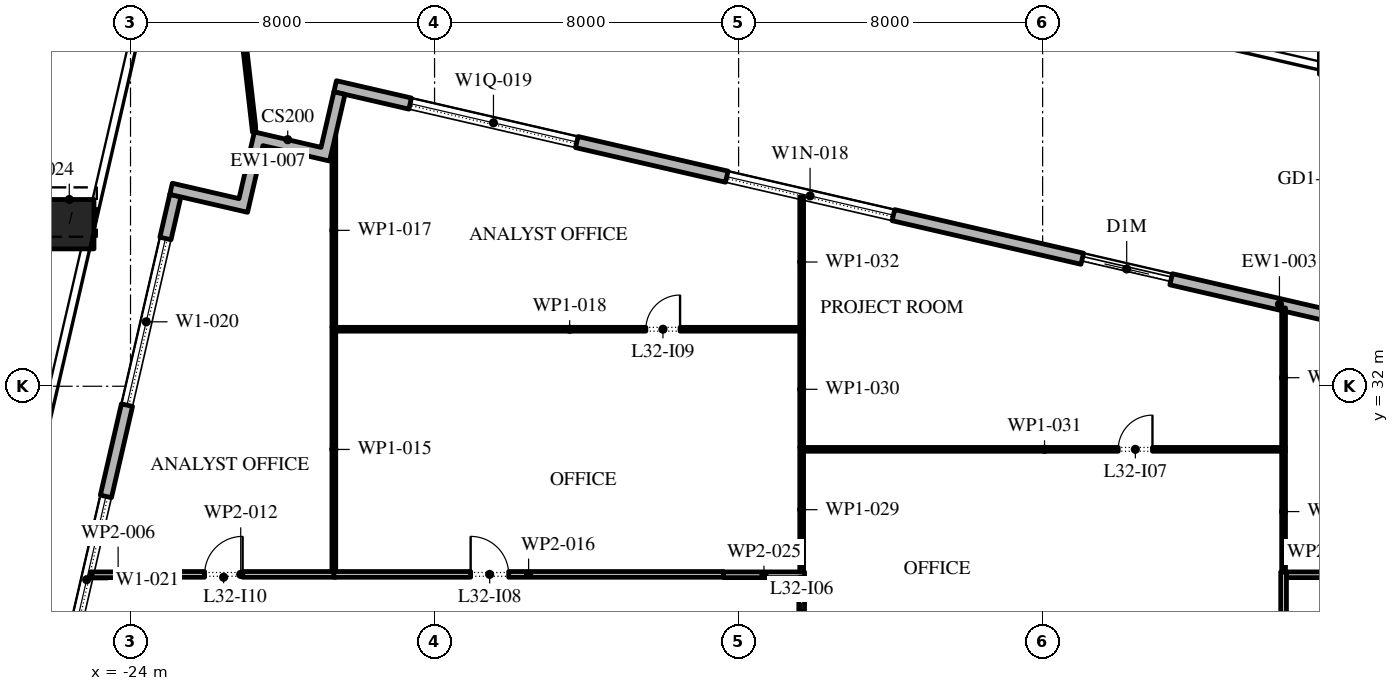
"""IFC4 building model, lengths in metres.
Left out: names, types, materials, properties, quantities, classifications, styles, units other than length and angle.
Written with IfcOpenShell. Run it as: python <this file> out.ifc"""

import sys

from ifc_helpers import new_model, si_unit, direction, frame, frame_2d, origin, origin_2d, place, context, subcontext, project, spatial, polyline, rectangle, outline, extrude, element, fill, save


model = new_model("IFC4")
c1 = context("Model", 3, precision=1e-05, world=origin(), true_north=direction((0.0, 1.0)))
c2 = subcontext(c1, "Body", "Model", "MODEL_VIEW")
j1 = project(units=[si_unit("LENGTHUNIT", "METRE"), si_unit("PLANEANGLEUNIT", "RADIAN")], contexts=[c1])
p1 = place(None, origin())
s1 = spatial("IfcSite", under=j1, at=p1, CompositionType="ELEMENT")
p2 = place(p1, origin())
s2 = spatial("IfcBuilding", under=s1, at=p2, CompositionType="ELEMENT")
p3 = place(p2, frame((0.0, 0.0, 147.6)))
s3 = spatial("IfcBuildingStorey", under=s2, at=p3, CompositionType="ELEMENT", Elevation=147.6)
p4 = place(p3, frame((7.933, 40.86, 0.0), z_axis=(0.020377493232, 0.0882252832, 0.995892091129), x_axis=(-0.97434807649, 0.225046274885, 0.0)))
e1 = element("IfcColumn", 1, at=p4, inside=s3, PredefinedType="COLUMN", context=c2, shape_type="SweptSolid", body=[
    extrude(rectangle(XDim=1.3, YDim=1.3, at=origin_2d()), origin(), (0.0, 0.0, 1.0), 4.217),
])
p5 = place(p3, frame((-25.611, 36.264, 0.0), z_axis=(0.017444089556, 0.075687644385, 0.996978978829), x_axis=(-0.974454034257, 0.224587032398, 0.0)))
e2 = element("IfcColumn", 2, at=p5, inside=s3, PredefinedType="COLUMN", context=c2, shape_type="SweptSolid", body=[
    extrude(rectangle(XDim=1.3, YDim=1.3, at=origin_2d()), origin(), (0.0, 0.0, 1.0), 4.213),
])
p6 = place(p3, frame((31.078, 28.421, 0.0), z_axis=(0.0, 0.0, 1.0), x_axis=(-0.974370456532, 0.224949357493, 0.0)))
e3 = element("IfcWall", 3, at=p6, inside=s3, PredefinedType="STANDARD", context=c2, shape_type="SweptSolid", body=[
    extrude(rectangle(XDim=51.0, YDim=0.3, at=frame_2d((25.5, 0.0))), origin(), (0.0, 0.0, 1.0), 4.0),
])
p7 = place(p6, frame((1.875, 0.0, 0.45)))
e4 = element("IfcOpeningElement", 4, at=p7, cuts=e3, PredefinedType="OPENING", context=c2, shape_type="SweptSolid", body=[
    extrude(rectangle(XDim=4.5, YDim=2.875, at=frame_2d((2.25, 1.438))), frame((0.0, 0.16, 0.0), z_axis=(0.0, -1.0, 0.0), x_axis=(1.0, 0.0, 0.0)), (0.0, 0.0, 1.0), 0.32),
])
p8 = place(p6, frame((10.275, 0.0, 0.45)))
e5 = element("IfcOpeningElement", 5, at=p8, cuts=e3, PredefinedType="OPENING", context=c2, shape_type="SweptSolid", body=[
    extrude(rectangle(XDim=4.5, YDim=2.75, at=frame_2d((2.25, 1.375))), frame((0.0, 0.16, 0.0), z_axis=(0.0, -1.0, 0.0), x_axis=(1.0, 0.0, 0.0)), (0.0, 0.0, 1.0), 0.32),
])
p9 = place(p6, frame((18.825, 0.0, 0.45)))
e6 = element("IfcOpeningElement", 6, at=p9, cuts=e3, PredefinedType="OPENING", context=c2, shape_type="SweptSolid", body=[
    extrude(rectangle(XDim=4.5, YDim=2.675, at=frame_2d((2.25, 1.337))), frame((0.0, 0.16, 0.0), z_axis=(0.0, -1.0, 0.0), x_axis=(1.0, 0.0, 0.0)), (0.0, 0.0, 1.0), 0.32),
])
p10 = place(p6, frame((28.425, 0.0, 0.0)))
e7 = element("IfcOpeningElement", 7, at=p10, cuts=e3, PredefinedType="OPENING", context=c2, shape_type="SweptSolid", body=[
    extrude(rectangle(XDim=2.4, YDim=3.025, at=frame_2d((1.2, 1.512))), frame((0.0, 0.16, 0.0), z_axis=(0.0, -1.0, 0.0), x_axis=(1.0, 0.0, 0.0)), (0.0, 0.0, 1.0), 0.32),
])
p11 = place(p6, frame((35.925, 0.0, 0.45)))
e8 = element("IfcOpeningElement", 8, at=p11, cuts=e3, PredefinedType="OPENING", context=c2, shape_type="SweptSolid", body=[
    extrude(rectangle(XDim=4.5, YDim=2.525, at=frame_2d((2.25, 1.262))), frame((0.0, 0.16, 0.0), z_axis=(0.0, -1.0, 0.0), x_axis=(1.0, 0.0, 0.0)), (0.0, 0.0, 1.0), 0.32),
])
p12 = place(p6, frame((44.475, 0.0, 0.45)))
e9 = element("IfcOpeningElement", 9, at=p12, cuts=e3, PredefinedType="OPENING", context=c2, shape_type="SweptSolid", body=[
    extrude(rectangle(XDim=4.5, YDim=2.45, at=frame_2d((2.25, 1.225))), frame((0.0, 0.16, 0.0), z_axis=(0.0, -1.0, 0.0), x_axis=(1.0, 0.0, 0.0)), (0.0, 0.0, 1.0), 0.32),
])
p13 = place(p3, frame((-22.82, 37.016, 0.0), z_axis=(0.0, 0.0, 1.0), x_axis=(-0.224953880882, -0.974369412223, 0.0)))
e10 = element("IfcWall", 10, at=p13, inside=s3, PredefinedType="STANDARD", context=c2, shape_type="SweptSolid", body=[
    extrude(rectangle(XDim=49.5, YDim=0.3, at=frame_2d((24.75, 0.0))), origin(), (0.0, 0.0, 1.0), 4.0),
])
p14 = place(p13, frame((1.157, 0.0, 0.45)))
e11 = element("IfcOpeningElement", 11, at=p14, cuts=e10, PredefinedType="OPENING", context=c2, shape_type="SweptSolid", body=[
    extrude(rectangle(XDim=4.5, YDim=3.05, at=frame_2d((2.25, 1.525))), frame((0.0, 0.16, 0.0), z_axis=(0.0, -1.0, 0.0), x_axis=(1.0, 0.0, 0.0)), (0.0, 0.0, 1.0), 0.32),
])
p15 = place(p13, frame((8.121, 0.0, 0.45)))
e12 = element("IfcOpeningElement", 12, at=p15, cuts=e10, PredefinedType="OPENING", context=c2, shape_type="SweptSolid", body=[
    extrude(rectangle(XDim=4.5, YDim=3.05, at=frame_2d((2.25, 1.525))), frame((0.0, 0.16, 0.0), z_axis=(0.0, -1.0, 0.0), x_axis=(1.0, 0.0, 0.0)), (0.0, 0.0, 1.0), 0.32),
])
p16 = place(p13, frame((15.236, 0.0, 0.45)))
e13 = element("IfcOpeningElement", 13, at=p16, cuts=e10, PredefinedType="OPENING", context=c2, shape_type="SweptSolid", body=[
    extrude(rectangle(XDim=4.5, YDim=3.05, at=frame_2d((2.25, 1.525))), frame((0.0, 0.16, 0.0), z_axis=(0.0, -1.0, 0.0), x_axis=(1.0, 0.0, 0.0)), (0.0, 0.0, 1.0), 0.32),
])
p17 = place(p13, frame((23.4, 0.0, 0.0)))
e14 = element("IfcOpeningElement", 14, at=p17, cuts=e10, PredefinedType="OPENING", context=c2, shape_type="SweptSolid", body=[
    extrude(rectangle(XDim=2.4, YDim=3.5, at=frame_2d((1.2, 1.75))), frame((0.0, 0.16, 0.0), z_axis=(0.0, -1.0, 0.0), x_axis=(1.0, 0.0, 0.0)), (0.0, 0.0, 1.0), 0.32),
])
p18 = place(p13, frame((29.464, 0.0, 0.45)))
e15 = element("IfcOpeningElement", 15, at=p18, cuts=e10, PredefinedType="OPENING", context=c2, shape_type="SweptSolid", body=[
    extrude(rectangle(XDim=4.5, YDim=2.875, at=frame_2d((2.25, 1.438))), frame((0.0, 0.16, 0.0), z_axis=(0.0, -1.0, 0.0), x_axis=(1.0, 0.0, 0.0)), (0.0, 0.0, 1.0), 0.32),
])
p19 = place(p13, frame((36.579, 0.0, 0.45)))
e16 = element("IfcOpeningElement", 16, at=p19, cuts=e10, PredefinedType="OPENING", context=c2, shape_type="SweptSolid", body=[
    extrude(rectangle(XDim=4.5, YDim=2.675, at=frame_2d((2.25, 1.337))), frame((0.0, 0.16, 0.0), z_axis=(0.0, -1.0, 0.0), x_axis=(1.0, 0.0, 0.0)), (0.0, 0.0, 1.0), 0.32),
])
p20 = place(p13, frame((43.693, 0.0, 0.45)))
e17 = element("IfcOpeningElement", 17, at=p20, cuts=e10, PredefinedType="OPENING", context=c2, shape_type="SweptSolid", body=[
    extrude(rectangle(XDim=4.5, YDim=3.05, at=frame_2d((2.25, 1.525))), frame((0.0, 0.16, 0.0), z_axis=(0.0, -1.0, 0.0), x_axis=(1.0, 0.0, 0.0)), (0.0, 0.0, 1.0), 0.32),
])
p21 = place(p3, origin())
e18 = element("IfcWall", 18, at=p21, inside=s3, PredefinedType="STANDARD", context=c2, shape_type="SweptSolid", body=[
    extrude(outline(polyline([(-22.967, 37.049), (-22.899, 37.342), (-21.145, 36.937), (-20.74, 38.691), (-18.986, 38.286), (-18.649, 39.747), (-18.357, 39.68), (-18.762, 37.926), (-20.515, 38.331), (-20.92, 36.577), (-22.967, 37.049)])), origin(), (0.0, 0.0, 1.0), 4.0),
])
p22 = place(p3, frame((-20.74, 38.691, -0.05), z_axis=(0.0, 0.0, 1.0), x_axis=(-0.113820349033, 0.993501347833, 0.0)))
e19 = element("IfcWall", 19, at=p22, inside=s3, PredefinedType="STANDARD", context=c2, shape_type="SweptSolid", body=[
    extrude(rectangle(XDim=6.238, YDim=0.1, at=frame_2d((3.119, 0.0))), origin(), (0.0, 0.0, 1.0), 4.05),
])
p23 = place(p3, frame((-25.052, 27.04, 0.0), z_axis=(0.0, 0.0, 1.0), x_axis=(1.0, 0.0, 0.0)))
e20 = element("IfcWall", 20, at=p23, inside=s3, PredefinedType="PARTITIONING", context=c2, shape_type="SweptSolid", body=[
    extrude(rectangle(XDim=1.452, YDim=0.15, at=frame_2d((0.726, 0.0))), origin(), (0.0, 0.0, 1.0), 4.0),
])
p24 = place(p3, frame((-23.6, 27.05, 0.0), z_axis=(0.0, 0.0, 1.0), x_axis=(1.0, 0.0, 0.0)))
e21 = element("IfcWall", 21, at=p24, inside=s3, PredefinedType="PARTITIONING", context=c2, shape_type="SweptSolid", body=[
    extrude(rectangle(XDim=5.0, YDim=0.15, at=frame_2d((2.5, 0.0))), origin(), (0.0, 0.0, 1.0), 4.0),
])
p25 = place(p24, frame((1.55, 0.0, 0.0)))
e22 = element("IfcOpeningElement", 22, at=p25, cuts=e21, PredefinedType="OPENING", context=c2, shape_type="SweptSolid", body=[
    extrude(rectangle(XDim=1.0, YDim=2.1, at=frame_2d((0.5, 1.05))), frame((0.0, 0.085, 0.0), z_axis=(0.0, -1.0, 0.0), x_axis=(1.0, 0.0, 0.0)), (0.0, 0.0, 1.0), 0.17),
])
p26 = place(p3, frame((-18.65, 27.125, 0.0), z_axis=(0.0, 0.0, 1.0), x_axis=(0.0, 1.0, 0.0)))
e23 = element("IfcWall", 23, at=p26, inside=s3, PredefinedType="PARTITIONING", context=c2, shape_type="SweptSolid", body=[
    extrude(rectangle(XDim=6.425, YDim=0.1, at=frame_2d((3.212, 0.0))), origin(), (0.0, 0.0, 1.0), 4.0),
])
p27 = place(p3, frame((-18.65, 27.05, 0.0), z_axis=(0.0, 0.0, 1.0), x_axis=(1.0, 0.0, 0.0)))
e24 = element("IfcWall", 24, at=p27, inside=s3, PredefinedType="PARTITIONING", context=c2, shape_type="SweptSolid", body=[
    extrude(rectangle(XDim=10.25, YDim=0.15, at=frame_2d((5.125, 0.0))), origin(), (0.0, 0.0, 1.0), 4.0),
])
p28 = place(p27, frame((3.6, 0.0, 0.0)))
e25 = element("IfcOpeningElement", 25, at=p28, cuts=e24, PredefinedType="OPENING", context=c2, shape_type="SweptSolid", body=[
    extrude(rectangle(XDim=1.0, YDim=2.1, at=frame_2d((0.5, 1.05))), frame((0.0, 0.085, 0.0), z_axis=(0.0, -1.0, 0.0), x_axis=(1.0, 0.0, 0.0)), (0.0, 0.0, 1.0), 0.17),
])
p29 = place(p3, frame((-18.65, 33.55, 0.0), z_axis=(0.0, 0.0, 1.0), x_axis=(0.0, 1.0, 0.0)))
e26 = element("IfcWall", 26, at=p29, inside=s3, PredefinedType="PARTITIONING", context=c2, shape_type="SweptSolid", body=[
    extrude(rectangle(XDim=5.104, YDim=0.1, at=frame_2d((2.552, 0.0))), origin(), (0.0, 0.0, 1.0), 4.0),
])
p30 = place(p3, frame((-18.6, 33.5, 0.0), z_axis=(0.0, 0.0, 1.0), x_axis=(1.0, 0.0, 0.0)))
e27 = element("IfcWall", 27, at=p30, inside=s3, PredefinedType="PARTITIONING", context=c2, shape_type="SweptSolid", body=[
    extrude(rectangle(XDim=12.31, YDim=0.1, at=frame_2d((6.155, 0.0))), origin(), (0.0, 0.0, 1.0), 4.0),
])
p31 = place(p30, frame((8.16, 0.0, 0.0)))
e28 = element("IfcOpeningElement", 28, at=p31, cuts=e27, PredefinedType="OPENING", context=c2, shape_type="SweptSolid", body=[
    extrude(rectangle(XDim=0.9, YDim=2.1, at=frame_2d((0.45, 1.05))), frame((0.0, 0.06, 0.0), z_axis=(0.0, -1.0, 0.0), x_axis=(1.0, 0.0, 0.0)), (0.0, 0.0, 1.0), 0.12),
])
p32 = place(p3, frame((-8.4, 27.04, 0.0), z_axis=(0.0, 0.0, 1.0), x_axis=(1.0, 0.0, 0.0)))
e29 = element("IfcWall", 29, at=p32, inside=s3, PredefinedType="PARTITIONING", context=c2, shape_type="SweptSolid", body=[
    extrude(rectangle(XDim=2.135, YDim=0.15, at=frame_2d((1.067, 0.0))), origin(), (0.0, 0.0, 1.0), 4.0),
])
p33 = place(p3, frame((-6.34, 26.965, 0.0), z_axis=(0.0, 0.0, 1.0), x_axis=(0.0, -1.0, 0.0)))
e30 = element("IfcWall", 30, at=p33, inside=s3, PredefinedType="PARTITIONING", context=c2, shape_type="SweptSolid", body=[
    extrude(rectangle(XDim=3.48, YDim=0.15, at=frame_2d((1.74, 0.0))), origin(), (0.0, 0.0, 1.0), 4.0),
])
p34 = place(p33, frame((0.905, 0.0, 0.0)))
e31 = element("IfcOpeningElement", 31, at=p34, cuts=e30, PredefinedType="OPENING", context=c2, shape_type="SweptSolid", body=[
    extrude(rectangle(XDim=1.0, YDim=2.1, at=frame_2d((0.5, 1.05))), frame((0.0, 0.085, 0.0), z_axis=(0.0, -1.0, 0.0), x_axis=(1.0, 0.0, 0.0)), (0.0, 0.0, 1.0), 0.17),
])
p35 = place(p3, frame((-6.34, 27.115, 0.0), z_axis=(0.0, 0.0, 1.0), x_axis=(0.0, 1.0, 0.0)))
e32 = element("IfcWall", 32, at=p35, inside=s3, PredefinedType="PARTITIONING", context=c2, shape_type="SweptSolid", body=[
    extrude(rectangle(XDim=3.275, YDim=0.1, at=frame_2d((1.637, 0.0))), origin(), (0.0, 0.0, 1.0), 4.0),
])
p36 = place(p3, frame((-6.34, 30.39, 0.0), z_axis=(0.0, 0.0, 1.0), x_axis=(0.0, 1.0, 0.0)))
e33 = element("IfcWall", 33, at=p36, inside=s3, PredefinedType="PARTITIONING", context=c2, shape_type="SweptSolid", body=[
    extrude(rectangle(XDim=3.06, YDim=0.1, at=frame_2d((1.53, 0.0))), origin(), (0.0, 0.0, 1.0), 4.0),
])
p37 = place(p3, frame((-6.29, 30.34, 0.0), z_axis=(0.0, 0.0, 1.0), x_axis=(1.0, 0.0, 0.0)))
e34 = element("IfcWall", 34, at=p37, inside=s3, PredefinedType="PARTITIONING", context=c2, shape_type="SweptSolid", body=[
    extrude(rectangle(XDim=12.68, YDim=0.1, at=frame_2d((6.34, 0.0))), origin(), (0.0, 0.0, 1.0), 4.0),
])
p38 = place(p37, frame((8.28, 0.0, 0.0)))
e35 = element("IfcOpeningElement", 35, at=p38, cuts=e34, PredefinedType="OPENING", context=c2, shape_type="SweptSolid", body=[
    extrude(rectangle(XDim=0.9, YDim=2.1, at=frame_2d((0.45, 1.05))), frame((0.0, 0.06, 0.0), z_axis=(0.0, -1.0, 0.0), x_axis=(1.0, 0.0, 0.0)), (0.0, 0.0, 1.0), 0.12),
])
p39 = place(p3, frame((-6.34, 33.55, 0.0), z_axis=(0.0, 0.0, 1.0), x_axis=(0.0, 1.0, 0.0)))
e36 = element("IfcWall", 36, at=p39, inside=s3, PredefinedType="PARTITIONING", context=c2, shape_type="SweptSolid", body=[
    extrude(rectangle(XDim=3.438, YDim=0.1, at=frame_2d((1.719, 0.0))), origin(), (0.0, 0.0, 1.0), 4.0),
])
p40 = place(p3, frame((6.34, 23.46, 0.0), z_axis=(0.0, 0.0, 1.0), x_axis=(0.0, 1.0, 0.0)))
e37 = element("IfcWall", 37, at=p40, inside=s3, PredefinedType="PARTITIONING", context=c2, shape_type="SweptSolid", body=[
    extrude(rectangle(XDim=3.655, YDim=0.15, at=frame_2d((1.828, 0.0))), origin(), (0.0, 0.0, 1.0), 4.0),
])
p41 = place(p3, frame((6.34, 27.115, 0.0), z_axis=(0.0, 0.0, 1.0), x_axis=(0.0, 1.0, 0.0)))
e38 = element("IfcWall", 38, at=p41, inside=s3, PredefinedType="PARTITIONING", context=c2, shape_type="SweptSolid", body=[
    extrude(rectangle(XDim=3.175, YDim=0.1, at=frame_2d((1.587, 0.0))), origin(), (0.0, 0.0, 1.0), 4.0),
])
p42 = place(p3, frame((6.415, 27.04, 0.0), z_axis=(0.0, 0.0, 1.0), x_axis=(1.0, 0.0, 0.0)))
e39 = element("IfcWall", 39, at=p42, inside=s3, PredefinedType="PARTITIONING", context=c2, shape_type="SweptSolid", body=[
    extrude(rectangle(XDim=1.985, YDim=0.15, at=frame_2d((0.992, 0.0))), origin(), (0.0, 0.0, 1.0), 4.0),
])
p43 = place(p3, frame((6.34, 30.39, 0.0), z_axis=(0.0, 0.0, 1.0), x_axis=(0.0, 1.0, 0.0)))
e40 = element("IfcWall", 40, at=p43, inside=s3, PredefinedType="PARTITIONING", context=c2, shape_type="SweptSolid", body=[
    extrude(rectangle(XDim=3.671, YDim=0.1, at=frame_2d((1.835, 0.0))), origin(), (0.0, 0.0, 1.0), 4.0),
])
p44 = place(p10, origin())
e41 = element("IfcDoor", 41, at=p44, inside=s3, OperationType="DOUBLE_DOOR_SLIDING", PredefinedType="DOOR", context=c2, shape_type="SweptSolid", body=[
    extrude(rectangle(XDim=2.4, YDim=3.025, at=frame_2d((1.2, 1.512))), frame((0.0, 0.025, 0.0), z_axis=(0.0, -1.0, 0.0), x_axis=(1.0, 0.0, 0.0)), (0.0, 0.0, 1.0), 0.05),
])
fill(e7, e41)
p45 = place(p11, origin())
e42 = element("IfcWindow", 42, at=p45, inside=s3, PartitioningType="DOUBLE_PANEL_VERTICAL", PredefinedType="WINDOW", context=c2, shape_type="SweptSolid", body=[
    extrude(rectangle(XDim=4.5, YDim=2.525, at=frame_2d((2.25, 1.262))), frame((0.0, 0.03, 0.0), z_axis=(0.0, -1.0, 0.0), x_axis=(1.0, 0.0, 0.0)), (0.0, 0.0, 1.0), 0.06),
])
fill(e8, e42)
p46 = place(p12, origin())
e43 = element("IfcWindow", 43, at=p46, inside=s3, PartitioningType="DOUBLE_PANEL_VERTICAL", PredefinedType="WINDOW", context=c2, shape_type="SweptSolid", body=[
    extrude(rectangle(XDim=4.5, YDim=2.45, at=frame_2d((2.25, 1.225))), frame((0.0, 0.03, 0.0), z_axis=(0.0, -1.0, 0.0), x_axis=(1.0, 0.0, 0.0)), (0.0, 0.0, 1.0), 0.06),
])
fill(e9, e43)
p47 = place(p14, origin())
e44 = element("IfcWindow", 44, at=p47, inside=s3, PartitioningType="DOUBLE_PANEL_VERTICAL", PredefinedType="WINDOW", context=c2, shape_type="SweptSolid", body=[
    extrude(rectangle(XDim=4.5, YDim=3.05, at=frame_2d((2.25, 1.525))), frame((0.0, 0.03, 0.0), z_axis=(0.0, -1.0, 0.0), x_axis=(1.0, 0.0, 0.0)), (0.0, 0.0, 1.0), 0.06),
])
fill(e11, e44)
p48 = place(p15, origin())
e45 = element("IfcWindow", 45, at=p48, inside=s3, PartitioningType="DOUBLE_PANEL_VERTICAL", PredefinedType="WINDOW", context=c2, shape_type="SweptSolid", body=[
    extrude(rectangle(XDim=4.5, YDim=3.05, at=frame_2d((2.25, 1.525))), frame((0.0, 0.03, 0.0), z_axis=(0.0, -1.0, 0.0), x_axis=(1.0, 0.0, 0.0)), (0.0, 0.0, 1.0), 0.06),
])
fill(e12, e45)
p49 = place(p38, origin())
e46 = element("IfcDoor", 46, at=p49, inside=s3, OperationType="SINGLE_SWING_LEFT", PredefinedType="DOOR", context=c2, shape_type="SweptSolid", body=[
    extrude(rectangle(XDim=0.9, YDim=2.1, at=frame_2d((0.45, 1.05))), frame((0.0, 0.025, 0.0), z_axis=(0.0, -1.0, 0.0), x_axis=(1.0, 0.0, 0.0)), (0.0, 0.0, 1.0), 0.05),
])
fill(e35, e46)
p50 = place(p28, origin())
e47 = element("IfcDoor", 47, at=p50, inside=s3, OperationType="SINGLE_SWING_RIGHT", PredefinedType="DOOR", context=c2, shape_type="SweptSolid", body=[
    extrude(rectangle(XDim=1.0, YDim=2.1, at=frame_2d((0.5, 1.05))), frame((0.0, 0.025, 0.0), z_axis=(0.0, -1.0, 0.0), x_axis=(1.0, 0.0, 0.0)), (0.0, 0.0, 1.0), 0.05),
])
fill(e25, e47)
p51 = place(p31, origin())
e48 = element("IfcDoor", 48, at=p51, inside=s3, OperationType="SINGLE_SWING_LEFT", PredefinedType="DOOR", context=c2, shape_type="SweptSolid", body=[
    extrude(rectangle(XDim=0.9, YDim=2.1, at=frame_2d((0.45, 1.05))), frame((0.0, 0.025, 0.0), z_axis=(0.0, -1.0, 0.0), x_axis=(1.0, 0.0, 0.0)), (0.0, 0.0, 1.0), 0.05),
])
fill(e28, e48)
p52 = place(p25, origin())
e49 = element("IfcDoor", 49, at=p52, inside=s3, OperationType="SINGLE_SWING_LEFT", PredefinedType="DOOR", context=c2, shape_type="SweptSolid", body=[
    extrude(rectangle(XDim=1.0, YDim=2.1, at=frame_2d((0.5, 1.05))), frame((0.0, 0.025, 0.0), z_axis=(0.0, -1.0, 0.0), x_axis=(1.0, 0.0, 0.0)), (0.0, 0.0, 1.0), 0.05),
])
fill(e22, e49)
save(model, sys.argv[1])
